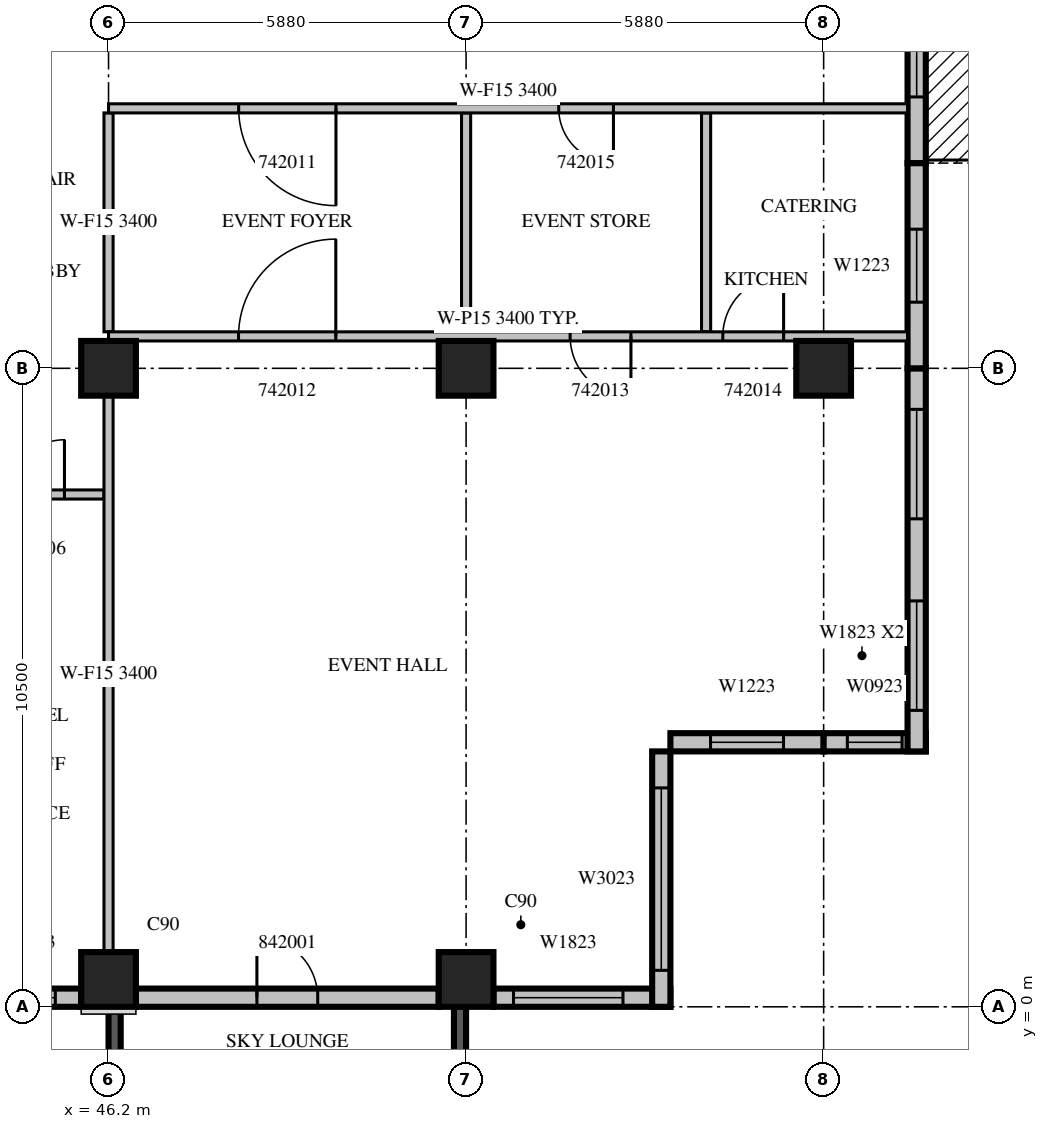
"""IFC4 building model, lengths in metres.
Left out: names, types, materials, properties, quantities, classifications, styles, units other than length and angle.
Written with IfcOpenShell. Run it as: python <this file> out.ifc"""

import sys

from ifc_helpers import new_model, si_unit, direction, frame, frame_2d, origin, origin_2d, place, context, subcontext, project, spatial, rectangle, extrude, source, transform, mapped, element, fill, save


model = new_model("IFC4")
c1 = context("Model", 3, precision=1e-05, world=origin(), true_north=direction((0.0, 1.0)))
c2 = subcontext(c1, "Body", "Model", "MODEL_VIEW")
j1 = project(units=[si_unit("LENGTHUNIT", "METRE"), si_unit("PLANEANGLEUNIT", "RADIAN")], contexts=[c1])
p1 = place(None, origin())
s1 = spatial("IfcSite", under=j1, at=p1, CompositionType="ELEMENT")
p2 = place(p1, origin())
s2 = spatial("IfcBuilding", under=s1, at=p2, CompositionType="ELEMENT")
p3 = place(p2, frame((0.0, 0.0, 193.0)))
s3 = spatial("IfcBuildingStorey", under=s2, at=p3, CompositionType="ELEMENT", Elevation=193.0)
m1 = source(origin(), c2, "Body", "SweptSolid", [
    extrude(rectangle(XDim=0.9, YDim=0.9, at=origin_2d()), origin(), (0.0, 0.0, 1.0), 3.8),
])
for number, where, z_axis, x_axis in (
    (1, (46.2, 0.45, 0.0), (0.0, 0.0, 1.0), (1.0, 0.0, 0.0)),
    (2, (52.08, 0.45, 0.0), (0.0, 0.0, 1.0), (1.0, 0.0, 0.0)),
    (3, (46.2, 10.5, 0.0), (0.0, 0.0, 1.0), (1.0, 0.0, 0.0)),
    (4, (52.08, 10.5, 0.0), (0.0, 0.0, 1.0), (1.0, 0.0, 0.0)),
    (5, (57.96, 10.5, 0.0), (0.0, 0.0, 1.0), (1.0, 0.0, 0.0)),
):
    element("IfcColumn", number, at=place(p3, frame(where, z_axis=z_axis, x_axis=x_axis)), inside=s3, PredefinedType="COLUMN", context=c2, shape_type="MappedRepresentation", body=[
        mapped(m1, transform((0.0, 0.0, 0.0), scale=1.0)),
    ])
m2 = source(origin(), c2, "Body", "SweptSolid", [
    extrude(rectangle(XDim=3.9, YDim=0.2, at=frame_2d((1.95, 0.0))), origin(), (0.0, 0.0, 1.0), 3.4),
])
p4 = place(p3, frame((46.3, 0.0, 0.0), z_axis=(0.0, 0.0, 1.0), x_axis=(0.0, -1.0, 0.0)))
e6 = element("IfcWall", 6, at=p4, inside=s3, PredefinedType="SOLIDWALL", context=c2, shape_type="MappedRepresentation", body=[
    mapped(m2, transform((0.0, 0.0, 0.0), scale=1.0)),
])
m3 = source(origin(), c2, "Body", "SweptSolid", [
    extrude(rectangle(XDim=2.4, YDim=2.3, at=frame_2d((1.2, 1.15))), frame((0.0, 0.11, 0.0), z_axis=(0.0, -1.0, 0.0), x_axis=(1.0, 0.0, 0.0)), (0.0, 0.0, 1.0), 0.22),
])
p5 = place(p4, frame((0.75, 0.0, 0.6)))
e7 = element("IfcOpeningElement", 7, at=p5, cuts=e6, PredefinedType="OPENING", context=c2, shape_type="MappedRepresentation", body=[
    mapped(m3, transform((0.0, 0.0, 0.0), scale=1.0)),
])
p6 = place(p3, frame((51.98, 0.0, 0.0), z_axis=(0.0, 0.0, 1.0), x_axis=(0.0, -1.0, 0.0)))
e8 = element("IfcWall", 8, at=p6, inside=s3, PredefinedType="SOLIDWALL", context=c2, shape_type="MappedRepresentation", body=[
    mapped(m2, transform((0.0, 0.0, 0.0), scale=1.0)),
])
p7 = place(p6, frame((0.75, 0.0, 0.6)))
e9 = element("IfcOpeningElement", 9, at=p7, cuts=e8, PredefinedType="OPENING", context=c2, shape_type="MappedRepresentation", body=[
    mapped(m3, transform((0.0, 0.0, 0.0), scale=1.0)),
])
m4 = source(origin(), c2, "Body", "SweptSolid", [
    extrude(rectangle(XDim=1.75, YDim=0.3, at=frame_2d((0.875, 0.0))), origin(), (0.0, 0.0, 1.0), 3.4),
])
p8 = place(p3, frame((44.0, 0.15, 0.0), z_axis=(0.0, 0.0, 1.0), x_axis=(1.0, 0.0, 0.0)))
e10 = element("IfcWall", 10, at=p8, inside=s3, PredefinedType="STANDARD", context=c2, shape_type="MappedRepresentation", body=[
    mapped(m4, transform((0.0, 0.0, 0.0), scale=1.0)),
])
m5 = source(origin(), c2, "Body", "SweptSolid", [
    extrude(rectangle(XDim=0.9, YDim=2.3, at=frame_2d((0.45, 1.15))), frame((0.0, 0.16, 0.0), z_axis=(0.0, -1.0, 0.0), x_axis=(1.0, 0.0, 0.0)), (0.0, 0.0, 1.0), 0.32),
])
p9 = place(p8, frame((0.425, 0.0, 0.6)))
e11 = element("IfcOpeningElement", 11, at=p9, cuts=e10, PredefinedType="OPENING", context=c2, shape_type="MappedRepresentation", body=[
    mapped(m5, transform((0.0, 0.0, 0.0), scale=1.0)),
])
m6 = source(origin(), c2, "Body", "SweptSolid", [
    extrude(rectangle(XDim=4.98, YDim=0.3, at=frame_2d((2.49, 0.0))), origin(), (0.0, 0.0, 1.0), 3.4),
])
p10 = place(p3, frame((46.65, 0.15, 0.0), z_axis=(0.0, 0.0, 1.0), x_axis=(1.0, 0.0, 0.0)))
e12 = element("IfcWall", 12, at=p10, inside=s3, PredefinedType="STANDARD", context=c2, shape_type="MappedRepresentation", body=[
    mapped(m6, transform((0.0, 0.0, 0.0), scale=1.0)),
])
m7 = source(origin(), c2, "Body", "SweptSolid", [
    extrude(rectangle(XDim=1.0, YDim=2.1, at=frame_2d((0.5, 1.05))), frame((0.0, 0.16, 0.0), z_axis=(0.0, -1.0, 0.0), x_axis=(1.0, 0.0, 0.0)), (0.0, 0.0, 1.0), 0.32),
])
p11 = place(p10, frame((1.99, 0.0, 0.0)))
e13 = element("IfcOpeningElement", 13, at=p11, cuts=e12, PredefinedType="OPENING", context=c2, shape_type="MappedRepresentation", body=[
    mapped(m7, transform((0.0, 0.0, 0.0), scale=1.0)),
])
m8 = source(origin(), c2, "Body", "SweptSolid", [
    extrude(rectangle(XDim=2.91, YDim=0.3, at=frame_2d((1.455, 0.0))), origin(), (0.0, 0.0, 1.0), 3.4),
])
p12 = place(p3, frame((52.53, 0.15, 0.0), z_axis=(0.0, 0.0, 1.0), x_axis=(1.0, 0.0, 0.0)))
e14 = element("IfcWall", 14, at=p12, inside=s3, PredefinedType="STANDARD", context=c2, shape_type="MappedRepresentation", body=[
    mapped(m8, transform((0.0, 0.0, 0.0), scale=1.0)),
])
m9 = source(origin(), c2, "Body", "SweptSolid", [
    extrude(rectangle(XDim=1.8, YDim=2.3, at=frame_2d((0.9, 1.15))), frame((0.0, 0.16, 0.0), z_axis=(0.0, -1.0, 0.0), x_axis=(1.0, 0.0, 0.0)), (0.0, 0.0, 1.0), 0.32),
])
p13 = place(p12, frame((0.33, 0.0, 0.6)))
e15 = element("IfcOpeningElement", 15, at=p13, cuts=e14, PredefinedType="OPENING", context=c2, shape_type="MappedRepresentation", body=[
    mapped(m9, transform((0.0, 0.0, 0.0), scale=1.0)),
])
m10 = source(origin(), c2, "Body", "SweptSolid", [
    extrude(rectangle(XDim=4.2, YDim=0.3, at=frame_2d((2.1, 0.0))), origin(), (0.0, 0.0, 1.0), 3.4),
])
p14 = place(p3, frame((55.29, 0.0, 0.0), z_axis=(0.0, 0.0, 1.0), x_axis=(0.0, 1.0, 0.0)))
e16 = element("IfcWall", 16, at=p14, inside=s3, PredefinedType="STANDARD", context=c2, shape_type="MappedRepresentation", body=[
    mapped(m10, transform((0.0, 0.0, 0.0), scale=1.0)),
])
m11 = source(origin(), c2, "Body", "SweptSolid", [
    extrude(rectangle(XDim=3.0, YDim=2.3, at=frame_2d((1.5, 1.15))), frame((0.0, 0.16, 0.0), z_axis=(0.0, -1.0, 0.0), x_axis=(1.0, 0.0, 0.0)), (0.0, 0.0, 1.0), 0.32),
])
p15 = place(p14, frame((0.6, 0.0, 0.6)))
e17 = element("IfcOpeningElement", 17, at=p15, cuts=e16, PredefinedType="OPENING", context=c2, shape_type="MappedRepresentation", body=[
    mapped(m11, transform((0.0, 0.0, 0.0), scale=1.0)),
])
m12 = source(origin(), c2, "Body", "SweptSolid", [
    extrude(rectangle(XDim=2.52, YDim=0.3, at=frame_2d((1.26, 0.0))), origin(), (0.0, 0.0, 1.0), 3.4),
])
p16 = place(p3, frame((55.44, 4.35, 0.0), z_axis=(0.0, 0.0, 1.0), x_axis=(1.0, 0.0, 0.0)))
e18 = element("IfcWall", 18, at=p16, inside=s3, PredefinedType="STANDARD", context=c2, shape_type="MappedRepresentation", body=[
    mapped(m12, transform((0.0, 0.0, 0.0), scale=1.0)),
])
m13 = source(origin(), c2, "Body", "SweptSolid", [
    extrude(rectangle(XDim=1.2, YDim=2.3, at=frame_2d((0.6, 1.15))), frame((0.0, 0.16, 0.0), z_axis=(0.0, -1.0, 0.0), x_axis=(1.0, 0.0, 0.0)), (0.0, 0.0, 1.0), 0.32),
])
p17 = place(p16, frame((0.66, 0.0, 0.6)))
e19 = element("IfcOpeningElement", 19, at=p17, cuts=e18, PredefinedType="OPENING", context=c2, shape_type="MappedRepresentation", body=[
    mapped(m13, transform((0.0, 0.0, 0.0), scale=1.0)),
])
m14 = source(origin(), c2, "Body", "SweptSolid", [
    extrude(rectangle(XDim=1.68, YDim=0.3, at=frame_2d((0.84, 0.0))), origin(), (0.0, 0.0, 1.0), 3.4),
])
p18 = place(p3, frame((57.96, 4.35, 0.0), z_axis=(0.0, 0.0, 1.0), x_axis=(1.0, 0.0, 0.0)))
e20 = element("IfcWall", 20, at=p18, inside=s3, PredefinedType="STANDARD", context=c2, shape_type="MappedRepresentation", body=[
    mapped(m14, transform((0.0, 0.0, 0.0), scale=1.0)),
])
p19 = place(p18, frame((0.39, 0.0, 0.6)))
e21 = element("IfcOpeningElement", 21, at=p19, cuts=e20, PredefinedType="OPENING", context=c2, shape_type="MappedRepresentation", body=[
    mapped(m5, transform((0.0, 0.0, 0.0), scale=1.0)),
])
m15 = source(origin(), c2, "Body", "SweptSolid", [
    extrude(rectangle(XDim=6.3, YDim=0.3, at=frame_2d((3.15, 0.0))), origin(), (0.0, 0.0, 1.0), 3.4),
])
p20 = place(p3, frame((59.49, 4.2, 0.0), z_axis=(0.0, 0.0, 1.0), x_axis=(0.0, 1.0, 0.0)))
e22 = element("IfcWall", 22, at=p20, inside=s3, PredefinedType="STANDARD", context=c2, shape_type="MappedRepresentation", body=[
    mapped(m15, transform((0.0, 0.0, 0.0), scale=1.0)),
])
p21 = place(p20, frame((0.675, 0.0, 0.6)))
e23 = element("IfcOpeningElement", 23, at=p21, cuts=e22, PredefinedType="OPENING", context=c2, shape_type="MappedRepresentation", body=[
    mapped(m9, transform((0.0, 0.0, 0.0), scale=1.0)),
])
p22 = place(p20, frame((3.825, 0.0, 0.6)))
e24 = element("IfcOpeningElement", 24, at=p22, cuts=e22, PredefinedType="OPENING", context=c2, shape_type="MappedRepresentation", body=[
    mapped(m9, transform((0.0, 0.0, 0.0), scale=1.0)),
])
m16 = source(origin(), c2, "Body", "SweptSolid", [
    extrude(rectangle(XDim=3.375, YDim=0.3, at=frame_2d((1.688, 0.0))), origin(), (0.0, 0.0, 1.0), 3.4),
])
p23 = place(p3, frame((59.49, 10.5, 0.0), z_axis=(0.0, 0.0, 1.0), x_axis=(0.0, 1.0, 0.0)))
e25 = element("IfcWall", 25, at=p23, inside=s3, PredefinedType="STANDARD", context=c2, shape_type="MappedRepresentation", body=[
    mapped(m16, transform((0.0, 0.0, 0.0), scale=1.0)),
])
p24 = place(p23, frame((1.087, 0.0, 0.6)))
e26 = element("IfcOpeningElement", 26, at=p24, cuts=e25, PredefinedType="OPENING", context=c2, shape_type="MappedRepresentation", body=[
    mapped(m13, transform((0.0, 0.0, 0.0), scale=1.0)),
])
p25 = place(p3, frame((59.49, 13.875, 0.0), z_axis=(0.0, 0.0, 1.0), x_axis=(0.0, 1.0, 0.0)))
e27 = element("IfcWall", 27, at=p25, inside=s3, PredefinedType="STANDARD", context=c2, shape_type="MappedRepresentation", body=[
    mapped(m16, transform((0.0, 0.0, 0.0), scale=1.0)),
])
m17 = source(origin(), c2, "Body", "SweptSolid", [
    extrude(rectangle(XDim=1.8, YDim=2.4, at=frame_2d((0.9, 1.2))), frame((0.0, 0.16, 0.0), z_axis=(0.0, -1.0, 0.0), x_axis=(1.0, 0.0, 0.0)), (0.0, 0.0, 1.0), 0.32),
])
p26 = place(p25, frame((1.087, 0.0, 0.0)))
e28 = element("IfcOpeningElement", 28, at=p26, cuts=e27, PredefinedType="OPENING", context=c2, shape_type="MappedRepresentation", body=[
    mapped(m17, transform((0.0, 0.0, 0.0), scale=1.0)),
])
m18 = source(origin(), c2, "Body", "SweptSolid", [
    extrude(rectangle(XDim=2.2, YDim=0.15, at=frame_2d((1.1, 0.0))), origin(), (0.0, 0.0, 1.0), 3.4),
])
p27 = place(p3, frame((46.125, 8.425, 0.0), z_axis=(0.0, 0.0, 1.0), x_axis=(-1.0, 0.0, 0.0)))
e29 = element("IfcWall", 29, at=p27, inside=s3, PredefinedType="PARTITIONING", context=c2, shape_type="MappedRepresentation", body=[
    mapped(m18, transform((0.0, 0.0, 0.0), scale=1.0)),
])
m19 = source(origin(), c2, "Body", "SweptSolid", [
    extrude(rectangle(XDim=0.9, YDim=2.1, at=frame_2d((0.45, 1.05))), frame((0.0, 0.085, 0.0), z_axis=(0.0, -1.0, 0.0), x_axis=(1.0, 0.0, 0.0)), (0.0, 0.0, 1.0), 0.17),
])
p28 = place(p27, frame((0.65, 0.0, 0.0)))
e30 = element("IfcOpeningElement", 30, at=p28, cuts=e29, PredefinedType="OPENING", context=c2, shape_type="MappedRepresentation", body=[
    mapped(m19, transform((0.0, 0.0, 0.0), scale=1.0)),
])
m20 = source(origin(), c2, "Body", "SweptSolid", [
    extrude(rectangle(XDim=3.6, YDim=0.15, at=frame_2d((1.8, 0.0))), origin(), (0.0, 0.0, 1.0), 3.4),
])
for number, where, z_axis, x_axis in (
    (31, (52.08, 11.1, 0.0), (0.0, 0.0, 1.0), (0.0, 1.0, 0.0)),
    (32, (56.027, 11.1, 0.0), (0.0, 0.0, 1.0), (0.0, 1.0, 0.0)),
):
    element("IfcWall", number, at=place(p3, frame(where, z_axis=z_axis, x_axis=x_axis)), inside=s3, PredefinedType="PARTITIONING", context=c2, shape_type="MappedRepresentation", body=[
        mapped(m20, transform((0.0, 0.0, 0.0), scale=1.0)),
    ])
m21 = source(origin(), c2, "Body", "SweptSolid", [
    extrude(rectangle(XDim=9.152, YDim=0.15, at=frame_2d((4.576, 0.0))), origin(), (0.0, 0.0, 1.0), 3.4),
])
p29 = place(p3, frame((46.2, 0.899, 0.0), z_axis=(0.0, 0.0, 1.0), x_axis=(0.0, 1.0, 0.0)))
e33 = element("IfcWall", 33, at=p29, inside=s3, PredefinedType="PARTITIONING", context=c2, shape_type="MappedRepresentation", body=[
    mapped(m21, transform((0.0, 0.0, 0.0), scale=1.0)),
])
p30 = place(p3, frame((46.2, 11.1, 0.0), z_axis=(0.0, 0.0, 1.0), x_axis=(0.0, 1.0, 0.0)))
e34 = element("IfcWall", 34, at=p30, inside=s3, PredefinedType="PARTITIONING", context=c2, shape_type="MappedRepresentation", body=[
    mapped(m20, transform((0.0, 0.0, 0.0), scale=1.0)),
])
m22 = source(origin(), c2, "Body", "SweptSolid", [
    extrude(rectangle(XDim=13.14, YDim=0.15, at=frame_2d((6.57, 0.0))), origin(), (0.0, 0.0, 1.0), 3.4),
])
p31 = place(p3, frame((59.34, 11.025, 0.0), z_axis=(0.0, 0.0, 1.0), x_axis=(-1.0, 0.0, 0.0)))
e35 = element("IfcWall", 35, at=p31, inside=s3, PredefinedType="PARTITIONING", context=c2, shape_type="MappedRepresentation", body=[
    mapped(m22, transform((0.0, 0.0, 0.0), scale=1.0)),
])
m23 = source(origin(), c2, "Body", "SweptSolid", [
    extrude(rectangle(XDim=1.6, YDim=2.1, at=frame_2d((0.8, 1.05))), frame((0.0, 0.085, 0.0), z_axis=(0.0, -1.0, 0.0), x_axis=(1.0, 0.0, 0.0)), (0.0, 0.0, 1.0), 0.17),
])
p32 = place(p31, frame((9.402, 0.0, 0.0)))
e36 = element("IfcOpeningElement", 36, at=p32, cuts=e35, PredefinedType="OPENING", context=c2, shape_type="MappedRepresentation", body=[
    mapped(m23, transform((0.0, 0.0, 0.0), scale=1.0)),
])
m24 = source(origin(), c2, "Body", "SweptSolid", [
    extrude(rectangle(XDim=1.0, YDim=2.1, at=frame_2d((0.5, 1.05))), frame((0.0, 0.085, 0.0), z_axis=(0.0, -1.0, 0.0), x_axis=(1.0, 0.0, 0.0)), (0.0, 0.0, 1.0), 0.17),
])
p33 = place(p31, frame((4.549, 0.0, 0.0)))
e37 = element("IfcOpeningElement", 37, at=p33, cuts=e35, PredefinedType="OPENING", context=c2, shape_type="MappedRepresentation", body=[
    mapped(m24, transform((0.0, 0.0, 0.0), scale=1.0)),
])
p34 = place(p31, frame((2.038, 0.0, 0.0)))
e38 = element("IfcOpeningElement", 38, at=p34, cuts=e35, PredefinedType="OPENING", context=c2, shape_type="MappedRepresentation", body=[
    mapped(m24, transform((0.0, 0.0, 0.0), scale=1.0)),
])
p35 = place(p3, frame((59.34, 14.775, 0.0), z_axis=(0.0, 0.0, 1.0), x_axis=(-1.0, 0.0, 0.0)))
e39 = element("IfcWall", 39, at=p35, inside=s3, PredefinedType="PARTITIONING", context=c2, shape_type="MappedRepresentation", body=[
    mapped(m22, transform((0.0, 0.0, 0.0), scale=1.0)),
])
p36 = place(p35, frame((9.4, 0.0, 0.0)))
e40 = element("IfcOpeningElement", 40, at=p36, cuts=e39, PredefinedType="OPENING", context=c2, shape_type="MappedRepresentation", body=[
    mapped(m23, transform((0.0, 0.0, 0.0), scale=1.0)),
])
p37 = place(p35, frame((4.837, 0.0, 0.0)))
e41 = element("IfcOpeningElement", 41, at=p37, cuts=e39, PredefinedType="OPENING", context=c2, shape_type="MappedRepresentation", body=[
    mapped(m19, transform((0.0, 0.0, 0.0), scale=1.0)),
])
m25 = source(origin(), c2, "Body", "SweptSolid", [
    extrude(rectangle(XDim=0.9, YDim=2.3, at=frame_2d((0.45, 1.15))), frame((0.0, 0.03, 0.0), z_axis=(0.0, -1.0, 0.0), x_axis=(1.0, 0.0, 0.0)), (0.0, 0.0, 1.0), 0.06),
])
p38 = place(p9, origin())
e42 = element("IfcWindow", 42, at=p38, inside=s3, PartitioningType="SINGLE_PANEL", PredefinedType="WINDOW", context=c2, shape_type="MappedRepresentation", body=[
    mapped(m25, transform((0.0, 0.0, 0.0), scale=1.0)),
])
fill(e11, e42)
m26 = source(origin(), c2, "Body", "SweptSolid", [
    extrude(rectangle(XDim=1.8, YDim=2.3, at=frame_2d((0.9, 1.15))), frame((0.0, 0.03, 0.0), z_axis=(0.0, -1.0, 0.0), x_axis=(1.0, 0.0, 0.0)), (0.0, 0.0, 1.0), 0.06),
])
p39 = place(p13, origin())
e43 = element("IfcWindow", 43, at=p39, inside=s3, PartitioningType="SINGLE_PANEL", PredefinedType="WINDOW", context=c2, shape_type="MappedRepresentation", body=[
    mapped(m26, transform((0.0, 0.0, 0.0), scale=1.0)),
])
fill(e15, e43)
m27 = source(origin(), c2, "Body", "SweptSolid", [
    extrude(rectangle(XDim=3.0, YDim=2.3, at=frame_2d((1.5, 1.15))), frame((0.0, 0.03, 0.0), z_axis=(0.0, -1.0, 0.0), x_axis=(1.0, 0.0, 0.0)), (0.0, 0.0, 1.0), 0.06),
])
p40 = place(p15, origin())
e44 = element("IfcWindow", 44, at=p40, inside=s3, PartitioningType="SINGLE_PANEL", PredefinedType="WINDOW", context=c2, shape_type="MappedRepresentation", body=[
    mapped(m27, transform((0.0, 0.0, 0.0), scale=1.0)),
])
fill(e17, e44)
m28 = source(origin(), c2, "Body", "SweptSolid", [
    extrude(rectangle(XDim=1.2, YDim=2.3, at=frame_2d((0.6, 1.15))), frame((0.0, 0.03, 0.0), z_axis=(0.0, -1.0, 0.0), x_axis=(1.0, 0.0, 0.0)), (0.0, 0.0, 1.0), 0.06),
])
p41 = place(p17, origin())
e45 = element("IfcWindow", 45, at=p41, inside=s3, PartitioningType="SINGLE_PANEL", PredefinedType="WINDOW", context=c2, shape_type="MappedRepresentation", body=[
    mapped(m28, transform((0.0, 0.0, 0.0), scale=1.0)),
])
fill(e19, e45)
p42 = place(p19, origin())
e46 = element("IfcWindow", 46, at=p42, inside=s3, PartitioningType="SINGLE_PANEL", PredefinedType="WINDOW", context=c2, shape_type="MappedRepresentation", body=[
    mapped(m25, transform((0.0, 0.0, 0.0), scale=1.0)),
])
fill(e21, e46)
p43 = place(p21, origin())
e47 = element("IfcWindow", 47, at=p43, inside=s3, PartitioningType="SINGLE_PANEL", PredefinedType="WINDOW", context=c2, shape_type="MappedRepresentation", body=[
    mapped(m26, transform((0.0, 0.0, 0.0), scale=1.0)),
])
fill(e23, e47)
p44 = place(p22, origin())
e48 = element("IfcWindow", 48, at=p44, inside=s3, PartitioningType="SINGLE_PANEL", PredefinedType="WINDOW", context=c2, shape_type="MappedRepresentation", body=[
    mapped(m26, transform((0.0, 0.0, 0.0), scale=1.0)),
])
fill(e24, e48)
p45 = place(p24, origin())
e49 = element("IfcWindow", 49, at=p45, inside=s3, PartitioningType="SINGLE_PANEL", PredefinedType="WINDOW", context=c2, shape_type="MappedRepresentation", body=[
    mapped(m28, transform((0.0, 0.0, 0.0), scale=1.0)),
])
fill(e26, e49)
m29 = source(origin(), c2, "Body", "SweptSolid", [
    extrude(rectangle(XDim=1.8, YDim=2.4, at=frame_2d((0.9, 1.2))), frame((0.0, 0.025, 0.0), z_axis=(0.0, -1.0, 0.0), x_axis=(1.0, 0.0, 0.0)), (0.0, 0.0, 1.0), 0.05),
])
p46 = place(p26, origin())
e50 = element("IfcDoor", 50, at=p46, inside=s3, OperationType="SLIDING_TO_LEFT", PredefinedType="DOOR", context=c2, shape_type="MappedRepresentation", body=[
    mapped(m29, transform((0.0, 0.0, 0.0), scale=1.0)),
])
fill(e28, e50)
m30 = source(origin(), c2, "Body", "SweptSolid", [
    extrude(rectangle(XDim=0.9, YDim=2.1, at=frame_2d((0.45, 1.05))), frame((0.0, 0.025, 0.0), z_axis=(0.0, -1.0, 0.0), x_axis=(1.0, 0.0, 0.0)), (0.0, 0.0, 1.0), 0.05),
])
p47 = place(p28, origin())
e51 = element("IfcDoor", 51, at=p47, inside=s3, OperationType="SINGLE_SWING_RIGHT", PredefinedType="DOOR", context=c2, shape_type="MappedRepresentation", body=[
    mapped(m30, transform((0.0, 0.0, 0.0), scale=1.0)),
])
fill(e30, e51)
m31 = source(origin(), c2, "Body", "SweptSolid", [
    extrude(rectangle(XDim=1.6, YDim=2.1, at=frame_2d((0.8, 1.05))), frame((0.0, 0.025, 0.0), z_axis=(0.0, -1.0, 0.0), x_axis=(1.0, 0.0, 0.0)), (0.0, 0.0, 1.0), 0.05),
])
p48 = place(p36, origin())
e52 = element("IfcDoor", 52, at=p48, inside=s3, OperationType="SINGLE_SWING_LEFT", PredefinedType="DOOR", context=c2, shape_type="MappedRepresentation", body=[
    mapped(m31, transform((0.0, 0.0, 0.0), scale=1.0)),
])
fill(e40, e52)
p49 = place(p32, origin())
e53 = element("IfcDoor", 53, at=p49, inside=s3, OperationType="SINGLE_SWING_RIGHT", PredefinedType="DOOR", context=c2, shape_type="MappedRepresentation", body=[
    mapped(m31, transform((0.0, 0.0, 0.0), scale=1.0)),
])
fill(e36, e53)
m32 = source(origin(), c2, "Body", "SweptSolid", [
    extrude(rectangle(XDim=1.0, YDim=2.1, at=frame_2d((0.5, 1.05))), frame((0.0, 0.025, 0.0), z_axis=(0.0, -1.0, 0.0), x_axis=(1.0, 0.0, 0.0)), (0.0, 0.0, 1.0), 0.05),
])
p50 = place(p33, origin())
e54 = element("IfcDoor", 54, at=p50, inside=s3, OperationType="SINGLE_SWING_LEFT", PredefinedType="DOOR", context=c2, shape_type="MappedRepresentation", body=[
    mapped(m32, transform((0.0, 0.0, 0.0), scale=1.0)),
])
fill(e37, e54)
p51 = place(p34, origin())
e55 = element("IfcDoor", 55, at=p51, inside=s3, OperationType="SINGLE_SWING_RIGHT", PredefinedType="DOOR", context=c2, shape_type="MappedRepresentation", body=[
    mapped(m32, transform((0.0, 0.0, 0.0), scale=1.0)),
])
fill(e38, e55)
p52 = place(p37, origin())
e56 = element("IfcDoor", 56, at=p52, inside=s3, OperationType="SINGLE_SWING_LEFT", PredefinedType="DOOR", context=c2, shape_type="MappedRepresentation", body=[
    mapped(m30, transform((0.0, 0.0, 0.0), scale=1.0)),
])
fill(e41, e56)
p53 = place(p11, origin())
e57 = element("IfcDoor", 57, at=p53, inside=s3, OperationType="SINGLE_SWING_LEFT", PredefinedType="DOOR", context=c2, shape_type="MappedRepresentation", body=[
    mapped(m32, transform((0.0, 0.0, 0.0), scale=1.0)),
])
fill(e13, e57)
save(model, sys.argv[1])
